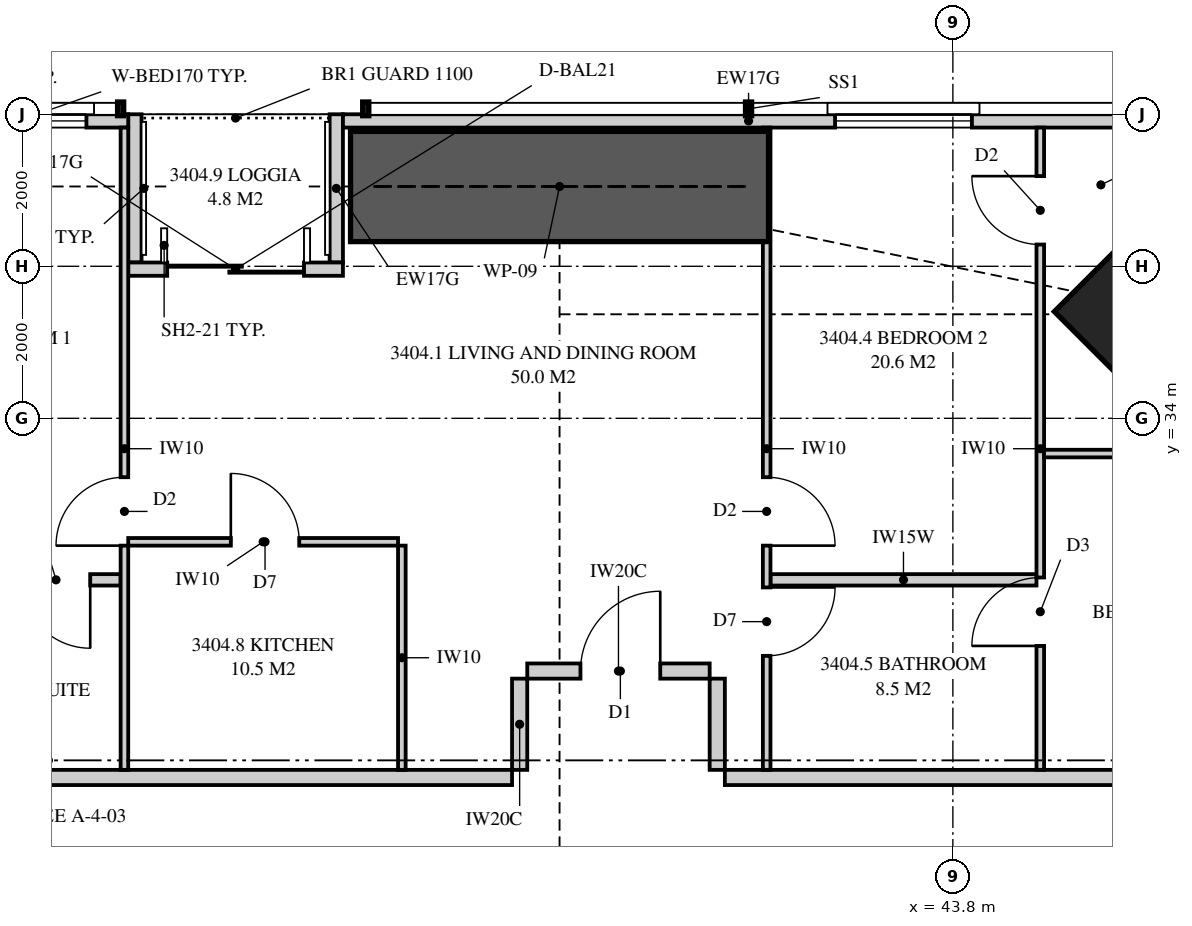
"""IFC4 building model, lengths in metres.
Left out: names, types, materials, properties, quantities, classifications, styles, units other than length and angle.
Written with IfcOpenShell. Run it as: python <this file> out.ifc"""

import sys

from ifc_helpers import new_model, si_unit, direction, frame, frame_2d, origin, origin_2d, place, context, subcontext, project, spatial, polyline, rectangle, outline, extrude, element, fill, save


model = new_model("IFC4")
c1 = context("Model", 3, precision=1e-05, world=origin(), true_north=direction((0.0, 1.0)))
c2 = subcontext(c1, "Body", "Model", "MODEL_VIEW")
j1 = project(units=[si_unit("LENGTHUNIT", "METRE"), si_unit("PLANEANGLEUNIT", "RADIAN")], contexts=[c1])
p1 = place(None, origin())
s1 = spatial("IfcSite", under=j1, at=p1, CompositionType="ELEMENT")
p2 = place(p1, origin())
s2 = spatial("IfcBuilding", under=s1, at=p2, CompositionType="ELEMENT")
p3 = place(p2, frame((0.0, 0.0, 124.95)))
s3 = spatial("IfcBuildingStorey", under=s2, at=p3, CompositionType="ELEMENT", Elevation=124.95)
p4 = place(p3, frame((46.869, 35.369, 0.0), z_axis=(0.0, 0.0, 1.0), x_axis=(-0.707106781187, -0.707106781187, 0.0)))
e1 = element("IfcColumn", 1, at=p4, inside=s3, PredefinedType="COLUMN", context=c2, shape_type="SweptSolid", body=[
    extrude(rectangle(XDim=2.4, YDim=2.5, at=origin_2d()), origin(), (0.0, 0.0, 1.0), 3.35),
])
p5 = place(p3, frame((46.449, 37.913, 0.0), z_axis=(0.0, 0.0, 1.0), x_axis=(-1.0, 0.0, 0.0)))
e2 = element("IfcWall", 2, at=p5, inside=s3, PredefinedType="SOLIDWALL", context=c2, shape_type="SweptSolid", body=[
    extrude(outline(polyline([(0.0, 0.0), (10.674, 0.0), (10.674, 2.15), (7.824, 2.15), (7.824, 3.11), (7.666, 3.11), (7.666, 2.15), (7.62, 2.15), (7.62, 3.11), (0.0, 3.11), (0.0, 0.0)])), frame((0.0, 0.087, 0.0), z_axis=(0.0, -1.0, 0.0), x_axis=(1.0, 0.0, 0.0)), (0.0, 0.0, 1.0), 0.175),
])
p6 = place(p5, frame((2.399, 0.0, 0.4)))
e3 = element("IfcOpeningElement", 3, at=p6, cuts=e2, PredefinedType="OPENING", context=c2, shape_type="SweptSolid", body=[
    extrude(rectangle(XDim=1.8, YDim=1.7, at=frame_2d((0.9, 0.85))), frame((0.0, 0.097, 0.0), z_axis=(0.0, -1.0, 0.0), x_axis=(1.0, 0.0, 0.0)), (0.0, 0.0, 1.0), 0.195),
])
p7 = place(p3, frame((32.95, 37.913, 0.0), z_axis=(0.0, 0.0, 1.0), x_axis=(-1.0, 0.0, 0.0)))
e4 = element("IfcWall", 4, at=p7, inside=s3, PredefinedType="SOLIDWALL", context=c2, shape_type="SweptSolid", body=[
    extrude(rectangle(XDim=8.075, YDim=0.175, at=frame_2d((4.038, 0.0))), origin(), (0.0, 0.0, 1.0), 2.15),
])
p8 = place(p7, frame((0.55, 0.0, 0.4)))
e5 = element("IfcOpeningElement", 5, at=p8, cuts=e4, PredefinedType="OPENING", context=c2, shape_type="SweptSolid", body=[
    extrude(rectangle(XDim=1.8, YDim=1.7, at=frame_2d((0.9, 0.85))), frame((0.0, 0.097, 0.0), z_axis=(0.0, -1.0, 0.0), x_axis=(1.0, 0.0, 0.0)), (0.0, 0.0, 1.0), 0.195),
])
p9 = place(p3, frame((35.775, 35.962, 0.0), z_axis=(0.0, 0.0, 1.0), x_axis=(-1.0, 0.0, 0.0)))
e6 = element("IfcWall", 6, at=p9, inside=s3, PredefinedType="SOLIDWALL", context=c2, shape_type="SweptSolid", body=[
    extrude(rectangle(XDim=2.825, YDim=0.175, at=frame_2d((1.413, 0.0))), origin(), (0.0, 0.0, 1.0), 3.11),
])
p10 = place(p9, frame((0.512, 0.0, 0.0)))
e7 = element("IfcOpeningElement", 7, at=p10, cuts=e6, PredefinedType="OPENING", context=c2, shape_type="SweptSolid", body=[
    extrude(rectangle(XDim=1.8, YDim=2.1, at=frame_2d((0.9, 1.05))), frame((0.0, 0.097, 0.0), z_axis=(0.0, -1.0, 0.0), x_axis=(1.0, 0.0, 0.0)), (0.0, 0.0, 1.0), 0.195),
])
for number, where, z_axis, x_axis in (
    (8, (35.688, 38.0, 0.0), (0.0, 0.0, 1.0), (0.0, -1.0, 0.0)),
    (9, (33.038, 38.0, 0.0), (0.0, 0.0, 1.0), (0.0, -1.0, 0.0)),
):
    element("IfcWall", number, at=place(p3, frame(where, z_axis=z_axis, x_axis=x_axis)), inside=s3, PredefinedType="SOLIDWALL", context=c2, shape_type="SweptSolid", body=[
        extrude(outline(polyline([(0.0, 0.0), (1.95, 0.0), (1.95, 3.11), (1.75, 3.11), (1.75, 2.15), (0.15, 2.15), (0.15, 3.11), (0.0, 3.11), (0.0, 0.0)])), frame((0.0, 0.087, 0.0), z_axis=(0.0, -1.0, 0.0), x_axis=(1.0, 0.0, 0.0)), (0.0, 0.0, 1.0), 0.175),
    ])
p11 = place(p3, frame((29.4, 29.275, 0.0), z_axis=(0.0, 0.0, 1.0), x_axis=(1.0, 0.0, 0.0)))
e10 = element("IfcWall", 10, at=p11, inside=s3, PredefinedType="PARTITIONING", context=c2, shape_type="SweptSolid", body=[
    extrude(rectangle(XDim=8.6, YDim=0.2, at=frame_2d((4.3, 0.0))), origin(), (0.0, 0.0, 1.0), 3.11),
])
p12 = place(p3, frame((32.9, 37.825, 0.0), z_axis=(0.0, 0.0, 1.0), x_axis=(0.0, -1.0, 0.0)))
e11 = element("IfcWall", 11, at=p12, inside=s3, PredefinedType="PARTITIONING", context=c2, shape_type="SweptSolid", body=[
    extrude(outline(polyline([(0.0, 0.0), (8.45, 0.0), (8.45, 3.11), (1.635, 3.11), (1.635, 2.15), (0.0, 2.15), (0.0, 3.11), (0.0, 0.0)])), frame((0.0, 0.05, 0.0), z_axis=(0.0, -1.0, 0.0), x_axis=(1.0, 0.0, 0.0)), (0.0, 0.0, 1.0), 0.1),
])
p13 = place(p12, frame((4.6, 0.0, 0.0)))
e12 = element("IfcOpeningElement", 12, at=p13, cuts=e11, PredefinedType="OPENING", context=c2, shape_type="SweptSolid", body=[
    extrude(rectangle(XDim=0.9, YDim=2.1, at=frame_2d((0.45, 1.05))), frame((0.0, 0.06, 0.0), z_axis=(0.0, -1.0, 0.0), x_axis=(1.0, 0.0, 0.0)), (0.0, 0.0, 1.0), 0.12),
])
p14 = place(p3, frame((41.35, 37.825, 0.0), z_axis=(0.0, 0.0, 1.0), x_axis=(0.0, -1.0, 0.0)))
e13 = element("IfcWall", 13, at=p14, inside=s3, PredefinedType="PARTITIONING", context=c2, shape_type="SweptSolid", body=[
    extrude(outline(polyline([(0.0, 0.0), (8.45, 0.0), (8.45, 3.11), (3.716, 3.11), (3.716, 2.51), (2.208, 2.51), (2.208, 2.15), (0.453, 2.15), (0.453, 3.11), (0.0, 3.11), (0.0, 0.0)])), frame((0.0, 0.05, 0.0), z_axis=(0.0, -1.0, 0.0), x_axis=(1.0, 0.0, 0.0)), (0.0, 0.0, 1.0), 0.1),
])
p15 = place(p14, frame((4.6, 0.0, 0.0)))
e14 = element("IfcOpeningElement", 14, at=p15, cuts=e13, PredefinedType="OPENING", context=c2, shape_type="SweptSolid", body=[
    extrude(rectangle(XDim=0.9, YDim=2.1, at=frame_2d((0.45, 1.05))), frame((0.0, 0.06, 0.0), z_axis=(0.0, -1.0, 0.0), x_axis=(1.0, 0.0, 0.0)), (0.0, 0.0, 1.0), 0.12),
])
p16 = place(p14, frame((6.05, 0.0, 0.0)))
e15 = element("IfcOpeningElement", 15, at=p16, cuts=e13, PredefinedType="OPENING", context=c2, shape_type="SweptSolid", body=[
    extrude(rectangle(XDim=0.9, YDim=2.1, at=frame_2d((0.45, 1.05))), frame((0.0, 0.06, 0.0), z_axis=(0.0, -1.0, 0.0), x_axis=(1.0, 0.0, 0.0)), (0.0, 0.0, 1.0), 0.12),
])
p17 = place(p3, frame((44.95, 37.825, 0.0), z_axis=(0.0, 0.0, 1.0), x_axis=(0.0, -1.0, 0.0)))
e16 = element("IfcWall", 16, at=p17, inside=s3, PredefinedType="PARTITIONING", context=c2, shape_type="SweptSolid", body=[
    extrude(outline(polyline([(0.0, 0.0), (8.45, 0.0), (8.45, 3.11), (3.716, 3.11), (3.716, 2.51), (2.943, 2.51), (2.943, 2.15), (1.188, 2.15), (1.188, 3.11), (0.0, 3.11), (0.0, 0.0)])), frame((0.0, 0.05, 0.0), z_axis=(0.0, -1.0, 0.0), x_axis=(1.0, 0.0, 0.0)), (0.0, 0.0, 1.0), 0.1),
])
p18 = place(p17, frame((0.639, 0.0, 0.0)))
e17 = element("IfcOpeningElement", 17, at=p18, cuts=e16, PredefinedType="OPENING", context=c2, shape_type="SweptSolid", body=[
    extrude(rectangle(XDim=0.9, YDim=2.1, at=frame_2d((0.45, 1.05))), frame((0.0, 0.06, 0.0), z_axis=(0.0, -1.0, 0.0), x_axis=(1.0, 0.0, 0.0)), (0.0, 0.0, 1.0), 0.12),
])
p19 = place(p17, frame((5.919, 0.0, 0.0)))
e18 = element("IfcOpeningElement", 18, at=p19, cuts=e16, PredefinedType="OPENING", context=c2, shape_type="SweptSolid", body=[
    extrude(rectangle(XDim=0.9, YDim=2.1, at=frame_2d((0.45, 1.05))), frame((0.0, 0.06, 0.0), z_axis=(0.0, -1.0, 0.0), x_axis=(1.0, 0.0, 0.0)), (0.0, 0.0, 1.0), 0.12),
])
p20 = place(p3, frame((29.4, 31.875, 0.0), z_axis=(0.0, 0.0, 1.0), x_axis=(1.0, 0.0, 0.0)))
e19 = element("IfcWall", 19, at=p20, inside=s3, PredefinedType="PLUMBINGWALL", context=c2, shape_type="SweptSolid", body=[
    extrude(rectangle(XDim=3.45, YDim=0.15, at=frame_2d((1.725, 0.0))), origin(), (0.0, 0.0, 1.0), 3.11),
])
p21 = place(p20, frame((2.15, 0.0, 0.0)))
e20 = element("IfcOpeningElement", 20, at=p21, cuts=e19, PredefinedType="OPENING", context=c2, shape_type="SweptSolid", body=[
    extrude(rectangle(XDim=0.9, YDim=2.1, at=frame_2d((0.45, 1.05))), frame((0.0, 0.085, 0.0), z_axis=(0.0, -1.0, 0.0), x_axis=(1.0, 0.0, 0.0)), (0.0, 0.0, 1.0), 0.17),
])
p22 = place(p3, frame((41.4, 31.875, 0.0), z_axis=(0.0, 0.0, 1.0), x_axis=(1.0, 0.0, 0.0)))
e21 = element("IfcWall", 21, at=p22, inside=s3, PredefinedType="PLUMBINGWALL", context=c2, shape_type="SweptSolid", body=[
    extrude(rectangle(XDim=3.5, YDim=0.15, at=frame_2d((1.75, 0.0))), origin(), (0.0, 0.0, 1.0), 3.11),
])
p23 = place(p3, frame((45.0, 33.536, 0.0), z_axis=(0.0, 0.0, 1.0), x_axis=(1.0, 0.0, 0.0)))
e22 = element("IfcWall", 22, at=p23, inside=s3, PredefinedType="PARTITIONING", context=c2, shape_type="SweptSolid", body=[
    extrude(outline(polyline([(0.0, 0.0), (4.5, 0.0), (4.5, 3.11), (3.037, 3.11), (3.037, 2.15), (1.294, 2.15), (1.294, 3.11), (0.0, 3.11), (0.0, 0.0)])), frame((0.0, 0.05, 0.0), z_axis=(0.0, -1.0, 0.0), x_axis=(1.0, 0.0, 0.0)), (0.0, 0.0, 1.0), 0.1),
])
p24 = place(p23, frame((2.9, 0.0, 0.0)))
e23 = element("IfcOpeningElement", 23, at=p24, cuts=e22, PredefinedType="OPENING", context=c2, shape_type="SweptSolid", body=[
    extrude(rectangle(XDim=0.9, YDim=2.1, at=frame_2d((0.45, 1.05))), frame((0.0, 0.06, 0.0), z_axis=(0.0, -1.0, 0.0), x_axis=(1.0, 0.0, 0.0)), (0.0, 0.0, 1.0), 0.12),
])
p25 = place(p3, frame((32.95, 32.375, 0.0), z_axis=(0.0, 0.0, 1.0), x_axis=(1.0, 0.0, 0.0)))
e24 = element("IfcWall", 24, at=p25, inside=s3, PredefinedType="PARTITIONING", context=c2, shape_type="SweptSolid", body=[
    extrude(rectangle(XDim=3.55, YDim=0.1, at=frame_2d((1.775, 0.0))), origin(), (0.0, 0.0, 1.0), 3.11),
])
p26 = place(p25, frame((1.35, 0.0, 0.0)))
e25 = element("IfcOpeningElement", 25, at=p26, cuts=e24, PredefinedType="OPENING", context=c2, shape_type="SweptSolid", body=[
    extrude(rectangle(XDim=0.9, YDim=2.1, at=frame_2d((0.45, 1.05))), frame((0.0, 0.06, 0.0), z_axis=(0.0, -1.0, 0.0), x_axis=(1.0, 0.0, 0.0)), (0.0, 0.0, 1.0), 0.12),
])
p27 = place(p3, frame((36.55, 32.325, 0.0), z_axis=(0.0, 0.0, 1.0), x_axis=(0.0, -1.0, 0.0)))
e26 = element("IfcWall", 26, at=p27, inside=s3, PredefinedType="PARTITIONING", context=c2, shape_type="SweptSolid", body=[
    extrude(rectangle(XDim=2.95, YDim=0.1, at=frame_2d((1.475, 0.0))), origin(), (0.0, 0.0, 1.0), 3.11),
])
p28 = place(p3, frame((40.8, 29.275, 0.0), z_axis=(0.0, 0.0, 1.0), x_axis=(1.0, 0.0, 0.0)))
e27 = element("IfcWall", 27, at=p28, inside=s3, PredefinedType="PARTITIONING", context=c2, shape_type="SweptSolid", body=[
    extrude(rectangle(XDim=5.225, YDim=0.2, at=frame_2d((2.612, 0.0))), origin(), (0.0, 0.0, 1.0), 3.11),
])
p29 = place(p3, frame((38.2, 30.675, 0.0), z_axis=(0.0, 0.0, 1.0), x_axis=(1.0, 0.0, 0.0)))
e28 = element("IfcWall", 28, at=p29, inside=s3, PredefinedType="PARTITIONING", context=c2, shape_type="SweptSolid", body=[
    extrude(outline(polyline([(0.0, 0.0), (2.4, 0.0), (2.4, 3.11), (0.762, 3.11), (0.762, 2.541), (0.088, 2.541), (0.088, 3.11), (0.0, 3.11), (0.0, 0.0)])), frame((0.0, 0.1, 0.0), z_axis=(0.0, -1.0, 0.0), x_axis=(1.0, 0.0, 0.0)), (0.0, 0.0, 1.0), 0.2),
])
p30 = place(p29, frame((0.7, 0.0, 0.0)))
e29 = element("IfcOpeningElement", 29, at=p30, cuts=e28, PredefinedType="OPENING", context=c2, shape_type="SweptSolid", body=[
    extrude(rectangle(XDim=1.05, YDim=2.2, at=frame_2d((0.525, 1.1))), frame((0.0, 0.11, 0.0), z_axis=(0.0, -1.0, 0.0), x_axis=(1.0, 0.0, 0.0)), (0.0, 0.0, 1.0), 0.22),
])
for number, where, z_axis, x_axis in (
    (30, (38.1, 29.375, 0.0), (0.0, 0.0, 1.0), (0.0, 1.0, 0.0)),
    (31, (40.7, 29.375, 0.0), (0.0, 0.0, 1.0), (0.0, 1.0, 0.0)),
):
    element("IfcWall", number, at=place(p3, frame(where, z_axis=z_axis, x_axis=x_axis)), inside=s3, PredefinedType="PARTITIONING", context=c2, shape_type="SweptSolid", body=[
        extrude(rectangle(XDim=1.2, YDim=0.2, at=frame_2d((0.6, 0.0))), origin(), (0.0, 0.0, 1.0), 3.11),
    ])
p31 = place(p3, frame((35.875, 37.05, 0.0), z_axis=(0.0, 0.0, 1.0), x_axis=(1.0, 0.0, 0.0)))
e32 = element("IfcWall", 32, at=p31, inside=s3, PredefinedType="SHEAR", context=c2, shape_type="SweptSolid", body=[
    extrude(rectangle(XDim=5.5, YDim=1.45, at=frame_2d((2.75, 0.0))), origin(), (0.0, 0.0, 1.0), 3.35),
])
p32 = place(p6, origin())
e33 = element("IfcWindow", 33, at=p32, inside=s3, PartitioningType="SINGLE_PANEL", PredefinedType="WINDOW", context=c2, shape_type="SweptSolid", body=[
    extrude(rectangle(XDim=1.8, YDim=1.7, at=frame_2d((0.9, 0.85))), frame((0.0, 0.03, 0.0), z_axis=(0.0, -1.0, 0.0), x_axis=(1.0, 0.0, 0.0)), (0.0, 0.0, 1.0), 0.06),
])
fill(e3, e33)
p33 = place(p10, origin())
e34 = element("IfcDoor", 34, at=p33, inside=s3, OperationType="SLIDING_TO_LEFT", PredefinedType="DOOR", context=c2, shape_type="SweptSolid", body=[
    extrude(rectangle(XDim=1.8, YDim=2.1, at=frame_2d((0.9, 1.05))), frame((0.0, 0.025, 0.0), z_axis=(0.0, -1.0, 0.0), x_axis=(1.0, 0.0, 0.0)), (0.0, 0.0, 1.0), 0.05),
])
fill(e7, e34)
p34 = place(p8, origin())
e35 = element("IfcWindow", 35, at=p34, inside=s3, PartitioningType="SINGLE_PANEL", PredefinedType="WINDOW", context=c2, shape_type="SweptSolid", body=[
    extrude(rectangle(XDim=1.8, YDim=1.7, at=frame_2d((0.9, 0.85))), frame((0.0, 0.03, 0.0), z_axis=(0.0, -1.0, 0.0), x_axis=(1.0, 0.0, 0.0)), (0.0, 0.0, 1.0), 0.06),
])
fill(e5, e35)
p35 = place(p30, origin())
e36 = element("IfcDoor", 36, at=p35, inside=s3, OperationType="SINGLE_SWING_RIGHT", PredefinedType="DOOR", context=c2, shape_type="SweptSolid", body=[
    extrude(rectangle(XDim=1.05, YDim=2.2, at=frame_2d((0.525, 1.1))), frame((0.0, 0.025, 0.0), z_axis=(0.0, -1.0, 0.0), x_axis=(1.0, 0.0, 0.0)), (0.0, 0.0, 1.0), 0.05),
])
fill(e29, e36)
p36 = place(p13, frame((0.9, 0.0, 0.0), z_axis=(0.0, 0.0, 1.0), x_axis=(-1.0, 0.0, 0.0)))
e37 = element("IfcDoor", 37, at=p36, inside=s3, OperationType="SINGLE_SWING_LEFT", PredefinedType="DOOR", context=c2, shape_type="SweptSolid", body=[
    extrude(rectangle(XDim=0.9, YDim=2.1, at=frame_2d((0.45, 1.05))), frame((0.0, 0.025, 0.0), z_axis=(0.0, -1.0, 0.0), x_axis=(1.0, 0.0, 0.0)), (0.0, 0.0, 1.0), 0.05),
])
fill(e12, e37)
p37 = place(p21, frame((0.9, 0.0, 0.0), z_axis=(0.0, 0.0, 1.0), x_axis=(-1.0, 0.0, 0.0)))
e38 = element("IfcDoor", 38, at=p37, inside=s3, OperationType="SINGLE_SWING_LEFT", PredefinedType="DOOR", context=c2, shape_type="SweptSolid", body=[
    extrude(rectangle(XDim=0.9, YDim=2.1, at=frame_2d((0.45, 1.05))), frame((0.0, 0.025, 0.0), z_axis=(0.0, -1.0, 0.0), x_axis=(1.0, 0.0, 0.0)), (0.0, 0.0, 1.0), 0.05),
])
fill(e20, e38)
p38 = place(p15, origin())
e39 = element("IfcDoor", 39, at=p38, inside=s3, OperationType="SINGLE_SWING_RIGHT", PredefinedType="DOOR", context=c2, shape_type="SweptSolid", body=[
    extrude(rectangle(XDim=0.9, YDim=2.1, at=frame_2d((0.45, 1.05))), frame((0.0, 0.025, 0.0), z_axis=(0.0, -1.0, 0.0), x_axis=(1.0, 0.0, 0.0)), (0.0, 0.0, 1.0), 0.05),
])
fill(e14, e39)
p39 = place(p16, origin())
e40 = element("IfcDoor", 40, at=p39, inside=s3, OperationType="SINGLE_SWING_LEFT", PredefinedType="DOOR", context=c2, shape_type="SweptSolid", body=[
    extrude(rectangle(XDim=0.9, YDim=2.1, at=frame_2d((0.45, 1.05))), frame((0.0, 0.025, 0.0), z_axis=(0.0, -1.0, 0.0), x_axis=(1.0, 0.0, 0.0)), (0.0, 0.0, 1.0), 0.05),
])
fill(e15, e40)
p40 = place(p18, frame((0.9, 0.0, 0.0), z_axis=(0.0, 0.0, 1.0), x_axis=(-1.0, 0.0, 0.0)))
e41 = element("IfcDoor", 41, at=p40, inside=s3, OperationType="SINGLE_SWING_RIGHT", PredefinedType="DOOR", context=c2, shape_type="SweptSolid", body=[
    extrude(rectangle(XDim=0.9, YDim=2.1, at=frame_2d((0.45, 1.05))), frame((0.0, 0.025, 0.0), z_axis=(0.0, -1.0, 0.0), x_axis=(1.0, 0.0, 0.0)), (0.0, 0.0, 1.0), 0.05),
])
fill(e17, e41)
p41 = place(p19, frame((0.9, 0.0, 0.0), z_axis=(0.0, 0.0, 1.0), x_axis=(-1.0, 0.0, 0.0)))
e42 = element("IfcDoor", 42, at=p41, inside=s3, OperationType="SINGLE_SWING_LEFT", PredefinedType="DOOR", context=c2, shape_type="SweptSolid", body=[
    extrude(rectangle(XDim=0.9, YDim=2.1, at=frame_2d((0.45, 1.05))), frame((0.0, 0.025, 0.0), z_axis=(0.0, -1.0, 0.0), x_axis=(1.0, 0.0, 0.0)), (0.0, 0.0, 1.0), 0.05),
])
fill(e18, e42)
p42 = place(p26, origin())
e43 = element("IfcDoor", 43, at=p42, inside=s3, OperationType="SINGLE_SWING_LEFT", PredefinedType="DOOR", context=c2, shape_type="SweptSolid", body=[
    extrude(rectangle(XDim=0.9, YDim=2.1, at=frame_2d((0.45, 1.05))), frame((0.0, 0.025, 0.0), z_axis=(0.0, -1.0, 0.0), x_axis=(1.0, 0.0, 0.0)), (0.0, 0.0, 1.0), 0.05),
])
fill(e25, e43)
save(model, sys.argv[1])
